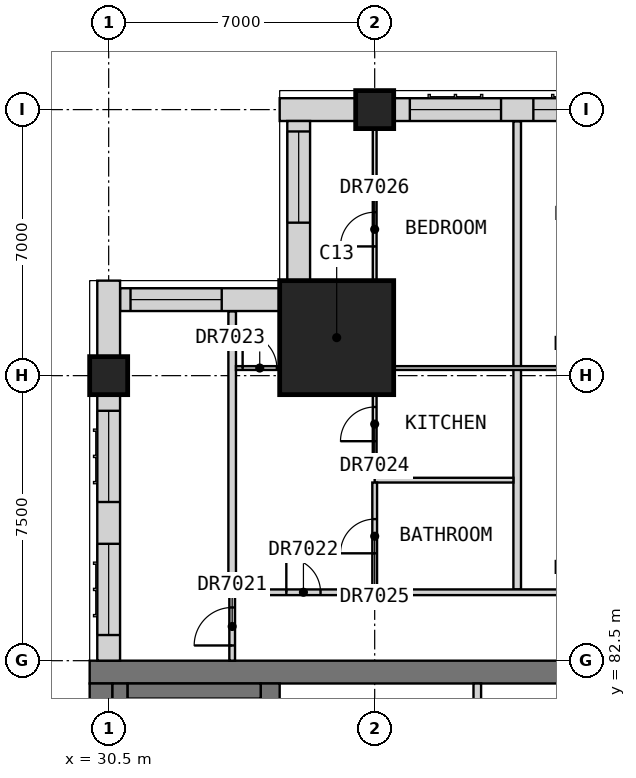
"""IFC4 building model, lengths in metres.
Left out: names, types, materials, properties, quantities, classifications, styles, units other than length and angle.
Written with IfcOpenShell. Run it as: python <this file> out.ifc"""

import sys

from ifc_helpers import new_model, si_unit, direction, frame, frame_2d, origin, origin_2d, place, context, subcontext, project, spatial, rectangle, extrude, element, fill, save


model = new_model("IFC4")
c1 = context("Model", 3, precision=1e-05, world=origin(), true_north=direction((0.0, 1.0)))
c2 = subcontext(c1, "Body", "Model", "MODEL_VIEW")
j1 = project(units=[si_unit("LENGTHUNIT", "METRE"), si_unit("PLANEANGLEUNIT", "RADIAN")], contexts=[c1])
p1 = place(None, origin())
s1 = spatial("IfcSite", under=j1, at=p1, CompositionType="ELEMENT")
p2 = place(p1, origin())
s2 = spatial("IfcBuilding", under=s1, at=p2, CompositionType="ELEMENT")
p3 = place(p2, frame((0.0, 0.0, 230.2)))
s3 = spatial("IfcBuildingStorey", under=s2, at=p3, CompositionType="ELEMENT", Elevation=230.2)
for number, where, z_axis, x_axis in (
    (1, (30.5, 90.0, 0.0), (0.0, 0.0, 1.0), (1.0, 0.0, 0.0)),
    (2, (37.5, 97.0, 0.0), (0.0, 0.0, 1.0), (1.0, 0.0, 0.0)),
):
    element("IfcColumn", number, at=place(p3, frame(where, z_axis=z_axis, x_axis=x_axis)), inside=s3, PredefinedType="COLUMN", context=c2, shape_type="SweptSolid", body=[
        extrude(rectangle(XDim=1.0, YDim=1.0, at=origin_2d()), origin(), (0.0, 0.0, 1.0), 3.5),
    ])
p4 = place(p3, frame((36.5, 91.0, 0.0), z_axis=(0.0, 0.0, 1.0), x_axis=(1.0, 0.0, 0.0)))
e3 = element("IfcColumn", 3, at=p4, inside=s3, PredefinedType="COLUMN", context=c2, shape_type="SweptSolid", body=[
    extrude(rectangle(XDim=3.0, YDim=3.0, at=origin_2d()), origin(), (0.0, 0.0, 1.0), 3.5),
])
p5 = place(p3, frame((30.0, 82.2, 0.0), z_axis=(0.0, 0.0, 1.0), x_axis=(1.0, 0.0, 0.0)))
e4 = element("IfcWall", 4, at=p5, inside=s3, PredefinedType="SHEAR", context=c2, shape_type="SweptSolid", body=[
    extrude(rectangle(XDim=30.0, YDim=0.6, at=frame_2d((15.0, 0.0))), origin(), (0.0, 0.0, 1.0), 3.5),
])
p6 = place(p3, frame((30.3, 60.6, 0.0), z_axis=(0.0, 0.0, 1.0), x_axis=(0.0, 1.0, 0.0)))
e5 = element("IfcWall", 5, at=p6, inside=s3, PredefinedType="SHEAR", context=c2, shape_type="SweptSolid", body=[
    extrude(rectangle(XDim=21.3, YDim=0.6, at=frame_2d((10.65, 0.0))), origin(), (0.0, 0.0, 1.0), 3.5),
])
p7 = place(p3, frame((34.75, 78.3, 0.0), z_axis=(0.0, 0.0, 1.0), x_axis=(0.0, 1.0, 0.0)))
e6 = element("IfcWall", 6, at=p7, inside=s3, PredefinedType="SHEAR", context=c2, shape_type="SweptSolid", body=[
    extrude(rectangle(XDim=3.6, YDim=0.5, at=frame_2d((1.8, 0.0))), origin(), (0.0, 0.0, 1.0), 3.5),
])
p8 = place(p3, frame((44.5, 97.0, 0.0), z_axis=(0.0, 0.0, 1.0), x_axis=(-1.0, 0.0, 0.0)))
e7 = element("IfcWall", 7, at=p8, inside=s3, PredefinedType="SOLIDWALL", context=c2, shape_type="SweptSolid", body=[
    extrude(rectangle(XDim=6.5, YDim=0.6, at=frame_2d((3.25, 0.0))), origin(), (0.0, 0.0, 1.0), 2.75),
])
p9 = place(p8, frame((3.675, 0.0, 0.8)))
e8 = element("IfcOpeningElement", 8, at=p9, cuts=e7, PredefinedType="OPENING", context=c2, shape_type="SweptSolid", body=[
    extrude(rectangle(XDim=2.4, YDim=1.8, at=frame_2d((1.2, 0.9))), frame((0.0, 0.31, 0.0), z_axis=(0.0, -1.0, 0.0), x_axis=(1.0, 0.0, 0.0)), (0.0, 0.0, 1.0), 0.62),
])
p10 = place(p8, frame((0.425, 0.0, 0.8)))
e9 = element("IfcOpeningElement", 9, at=p10, cuts=e7, PredefinedType="OPENING", context=c2, shape_type="SweptSolid", body=[
    extrude(rectangle(XDim=2.4, YDim=1.8, at=frame_2d((1.2, 0.9))), frame((0.0, 0.31, 0.0), z_axis=(0.0, -1.0, 0.0), x_axis=(1.0, 0.0, 0.0)), (0.0, 0.0, 1.0), 0.62),
])
p11 = place(p3, frame((37.0, 97.0, 0.0), z_axis=(0.0, 0.0, 1.0), x_axis=(-1.0, 0.0, 0.0)))
e10 = element("IfcWall", 10, at=p11, inside=s3, PredefinedType="SOLIDWALL", context=c2, shape_type="SweptSolid", body=[
    extrude(rectangle(XDim=2.0, YDim=0.6, at=frame_2d((1.0, 0.0))), origin(), (0.0, 0.0, 1.0), 3.25),
])
p12 = place(p3, frame((35.5, 96.7, 0.0), z_axis=(0.0, 0.0, 1.0), x_axis=(0.0, -1.0, 0.0)))
e11 = element("IfcWall", 11, at=p12, inside=s3, PredefinedType="SOLIDWALL", context=c2, shape_type="SweptSolid", body=[
    extrude(rectangle(XDim=4.2, YDim=0.6, at=frame_2d((2.1, 0.0))), origin(), (0.0, 0.0, 1.0), 3.25),
])
p13 = place(p12, frame((0.275, 0.0, 0.8)))
e12 = element("IfcOpeningElement", 12, at=p13, cuts=e11, PredefinedType="OPENING", context=c2, shape_type="SweptSolid", body=[
    extrude(rectangle(XDim=2.4, YDim=1.8, at=frame_2d((1.2, 0.9))), frame((0.0, 0.31, 0.0), z_axis=(0.0, -1.0, 0.0), x_axis=(1.0, 0.0, 0.0)), (0.0, 0.0, 1.0), 0.62),
])
p14 = place(p3, frame((35.0, 92.0, 0.0), z_axis=(0.0, 0.0, 1.0), x_axis=(-1.0, 0.0, 0.0)))
e13 = element("IfcWall", 13, at=p14, inside=s3, PredefinedType="SOLIDWALL", context=c2, shape_type="SweptSolid", body=[
    extrude(rectangle(XDim=4.2, YDim=0.6, at=frame_2d((2.1, 0.0))), origin(), (0.0, 0.0, 1.0), 3.25),
])
p15 = place(p14, frame((1.525, 0.0, 0.8)))
e14 = element("IfcOpeningElement", 14, at=p15, cuts=e13, PredefinedType="OPENING", context=c2, shape_type="SweptSolid", body=[
    extrude(rectangle(XDim=2.4, YDim=1.8, at=frame_2d((1.2, 0.9))), frame((0.0, 0.31, 0.0), z_axis=(0.0, -1.0, 0.0), x_axis=(1.0, 0.0, 0.0)), (0.0, 0.0, 1.0), 0.62),
])
p16 = place(p3, frame((30.5, 92.5, 0.0), z_axis=(0.0, 0.0, 1.0), x_axis=(0.0, -1.0, 0.0)))
e15 = element("IfcWall", 15, at=p16, inside=s3, PredefinedType="SOLIDWALL", context=c2, shape_type="SweptSolid", body=[
    extrude(rectangle(XDim=2.0, YDim=0.6, at=frame_2d((1.0, 0.0))), origin(), (0.0, 0.0, 1.0), 3.25),
])
p17 = place(p3, frame((30.5, 89.5, 0.0), z_axis=(0.0, 0.0, 1.0), x_axis=(0.0, -1.0, 0.0)))
e16 = element("IfcWall", 16, at=p17, inside=s3, PredefinedType="SOLIDWALL", context=c2, shape_type="SweptSolid", body=[
    extrude(rectangle(XDim=7.0, YDim=0.6, at=frame_2d((3.5, 0.0))), origin(), (0.0, 0.0, 1.0), 3.25),
])
p18 = place(p17, frame((3.925, 0.0, 0.8)))
e17 = element("IfcOpeningElement", 17, at=p18, cuts=e16, PredefinedType="OPENING", context=c2, shape_type="SweptSolid", body=[
    extrude(rectangle(XDim=2.4, YDim=1.8, at=frame_2d((1.2, 0.9))), frame((0.0, 0.31, 0.0), z_axis=(0.0, -1.0, 0.0), x_axis=(1.0, 0.0, 0.0)), (0.0, 0.0, 1.0), 0.62),
])
p19 = place(p17, frame((0.425, 0.0, 0.8)))
e18 = element("IfcOpeningElement", 18, at=p19, cuts=e16, PredefinedType="OPENING", context=c2, shape_type="SweptSolid", body=[
    extrude(rectangle(XDim=2.4, YDim=1.8, at=frame_2d((1.2, 0.9))), frame((0.0, 0.31, 0.0), z_axis=(0.0, -1.0, 0.0), x_axis=(1.0, 0.0, 0.0)), (0.0, 0.0, 1.0), 0.62),
])
p20 = place(p3, frame((40.2, 78.5, 0.0), z_axis=(0.0, 0.0, 1.0), x_axis=(0.0, 1.0, 0.0)))
e19 = element("IfcWall", 19, at=p20, inside=s3, PredefinedType="SOLIDWALL", context=c2, shape_type="SweptSolid", body=[
    extrude(rectangle(XDim=3.4, YDim=0.2, at=frame_2d((1.7, 0.0))), origin(), (0.0, 0.0, 1.0), 3.5),
])
p21 = place(p3, frame((30.8, 60.6, 0.0), z_axis=(0.0, 0.0, 1.0), x_axis=(0.0, 1.0, 0.0)))
e20 = element("IfcWall", 20, at=p21, inside=s3, PredefinedType="SOLIDWALL", context=c2, shape_type="SweptSolid", body=[
    extrude(rectangle(XDim=21.3, YDim=0.4, at=frame_2d((10.65, 0.0))), origin(), (0.0, 0.0, 1.0), 3.25),
])
p22 = place(p3, frame((31.0, 81.7, 0.0), z_axis=(0.0, 0.0, 1.0), x_axis=(1.0, 0.0, 0.0)))
e21 = element("IfcWall", 21, at=p22, inside=s3, PredefinedType="SOLIDWALL", context=c2, shape_type="SweptSolid", body=[
    extrude(rectangle(XDim=3.5, YDim=0.4, at=frame_2d((1.75, 0.0))), origin(), (0.0, 0.0, 1.0), 3.25),
])
p23 = place(p3, frame((33.75, 84.3, 0.0), z_axis=(0.0, 0.0, 1.0), x_axis=(0.0, 1.0, 0.0)))
e22 = element("IfcWall", 22, at=p23, inside=s3, PredefinedType="PARTITIONING", context=c2, shape_type="SweptSolid", body=[
    extrude(rectangle(XDim=7.39, YDim=0.2, at=frame_2d((3.695, 0.0))), origin(), (0.0, 0.0, 1.0), 3.25),
])
p24 = place(p3, frame((41.25, 84.375, 0.0), z_axis=(0.0, 0.0, 1.0), x_axis=(0.0, 1.0, 0.0)))
e23 = element("IfcWall", 23, at=p24, inside=s3, PredefinedType="PARTITIONING", context=c2, shape_type="SweptSolid", body=[
    extrude(rectangle(XDim=12.315, YDim=0.2, at=frame_2d((6.157, 0.0))), origin(), (0.0, 0.0, 1.0), 3.25),
])
p25 = place(p3, frame((33.85, 84.3, 0.0), z_axis=(0.0, 0.0, 1.0), x_axis=(1.0, 0.0, 0.0)))
e24 = element("IfcWall", 24, at=p25, inside=s3, PredefinedType="PARTITIONING", context=c2, shape_type="SweptSolid", body=[
    extrude(rectangle(XDim=27.95, YDim=0.15, at=frame_2d((13.975, 0.0))), origin(), (0.0, 0.0, 1.0), 3.25),
])
p26 = place(p25, frame((1.325, 0.0, 0.0)))
e25 = element("IfcOpeningElement", 25, at=p26, cuts=e24, PredefinedType="OPENING", context=c2, shape_type="SweptSolid", body=[
    extrude(rectangle(XDim=0.9, YDim=2.1, at=frame_2d((0.45, 1.05))), frame((0.0, 0.085, 0.0), z_axis=(0.0, -1.0, 0.0), x_axis=(1.0, 0.0, 0.0)), (0.0, 0.0, 1.0), 0.17),
])
p27 = place(p25, frame((8.825, 0.0, 0.0)))
e26 = element("IfcOpeningElement", 26, at=p27, cuts=e24, PredefinedType="OPENING", context=c2, shape_type="SweptSolid", body=[
    extrude(rectangle(XDim=0.9, YDim=2.1, at=frame_2d((0.45, 1.05))), frame((0.0, 0.085, 0.0), z_axis=(0.0, -1.0, 0.0), x_axis=(1.0, 0.0, 0.0)), (0.0, 0.0, 1.0), 0.17),
])
p28 = place(p25, frame((20.075, 0.0, 0.0)))
e27 = element("IfcOpeningElement", 27, at=p28, cuts=e24, PredefinedType="OPENING", context=c2, shape_type="SweptSolid", body=[
    extrude(rectangle(XDim=0.9, YDim=2.1, at=frame_2d((0.45, 1.05))), frame((0.0, 0.085, 0.0), z_axis=(0.0, -1.0, 0.0), x_axis=(1.0, 0.0, 0.0)), (0.0, 0.0, 1.0), 0.17),
])
p29 = place(p25, frame((26.55, 0.0, 0.0)))
e28 = element("IfcOpeningElement", 28, at=p29, cuts=e24, PredefinedType="OPENING", context=c2, shape_type="SweptSolid", body=[
    extrude(rectangle(XDim=1.0, YDim=2.1, at=frame_2d((0.5, 1.05))), frame((0.0, 0.085, 0.0), z_axis=(0.0, -1.0, 0.0), x_axis=(1.0, 0.0, 0.0)), (0.0, 0.0, 1.0), 0.17),
])
p30 = place(p3, frame((33.75, 82.5, 0.0), z_axis=(0.0, 0.0, 1.0), x_axis=(0.0, 1.0, 0.0)))
e29 = element("IfcWall", 29, at=p30, inside=s3, PredefinedType="PARTITIONING", context=c2, shape_type="SweptSolid", body=[
    extrude(rectangle(XDim=1.725, YDim=0.15, at=frame_2d((0.863, 0.0))), origin(), (0.0, 0.0, 1.0), 3.25),
])
p31 = place(p30, frame((0.4, 0.0, 0.0)))
e30 = element("IfcOpeningElement", 30, at=p31, cuts=e29, PredefinedType="OPENING", context=c2, shape_type="SweptSolid", body=[
    extrude(rectangle(XDim=1.0, YDim=2.1, at=frame_2d((0.5, 1.05))), frame((0.0, 0.085, 0.0), z_axis=(0.0, -1.0, 0.0), x_axis=(1.0, 0.0, 0.0)), (0.0, 0.0, 1.0), 0.17),
])
p32 = place(p3, frame((33.85, 90.2, 0.0), z_axis=(0.0, 0.0, 1.0), x_axis=(1.0, 0.0, 0.0)))
e31 = element("IfcWall", 31, at=p32, inside=s3, PredefinedType="PARTITIONING", context=c2, shape_type="SweptSolid", body=[
    extrude(rectangle(XDim=26.05, YDim=0.1, at=frame_2d((13.025, 0.0))), origin(), (0.0, 0.0, 1.0), 3.25),
])
p33 = place(p32, frame((0.175, 0.0, 0.0)))
e32 = element("IfcOpeningElement", 32, at=p33, cuts=e31, PredefinedType="OPENING", context=c2, shape_type="SweptSolid", body=[
    extrude(rectangle(XDim=0.9, YDim=2.1, at=frame_2d((0.45, 1.05))), frame((0.0, 0.06, 0.0), z_axis=(0.0, -1.0, 0.0), x_axis=(1.0, 0.0, 0.0)), (0.0, 0.0, 1.0), 0.12),
])
p34 = place(p32, frame((8.825, 0.0, 0.0)))
e33 = element("IfcOpeningElement", 33, at=p34, cuts=e31, PredefinedType="OPENING", context=c2, shape_type="SweptSolid", body=[
    extrude(rectangle(XDim=0.9, YDim=2.1, at=frame_2d((0.45, 1.05))), frame((0.0, 0.06, 0.0), z_axis=(0.0, -1.0, 0.0), x_axis=(1.0, 0.0, 0.0)), (0.0, 0.0, 1.0), 0.12),
])
p35 = place(p32, frame((16.325, 0.0, 0.0)))
e34 = element("IfcOpeningElement", 34, at=p35, cuts=e31, PredefinedType="OPENING", context=c2, shape_type="SweptSolid", body=[
    extrude(rectangle(XDim=0.9, YDim=2.1, at=frame_2d((0.45, 1.05))), frame((0.0, 0.06, 0.0), z_axis=(0.0, -1.0, 0.0), x_axis=(1.0, 0.0, 0.0)), (0.0, 0.0, 1.0), 0.12),
])
p36 = place(p32, frame((20.075, 0.0, 0.0)))
e35 = element("IfcOpeningElement", 35, at=p36, cuts=e31, PredefinedType="OPENING", context=c2, shape_type="SweptSolid", body=[
    extrude(rectangle(XDim=0.9, YDim=2.1, at=frame_2d((0.45, 1.05))), frame((0.0, 0.06, 0.0), z_axis=(0.0, -1.0, 0.0), x_axis=(1.0, 0.0, 0.0)), (0.0, 0.0, 1.0), 0.12),
])
p37 = place(p3, frame((37.5, 87.312, 0.0), z_axis=(0.0, 0.0, 1.0), x_axis=(0.0, 1.0, 0.0)))
e36 = element("IfcWall", 36, at=p37, inside=s3, PredefinedType="PARTITIONING", context=c2, shape_type="SweptSolid", body=[
    extrude(rectangle(XDim=10.188, YDim=0.1, at=frame_2d((5.094, 0.0))), origin(), (0.0, 0.0, 1.0), 2.75),
])
p38 = place(p37, frame((0.962, 0.0, 0.0)))
e37 = element("IfcOpeningElement", 37, at=p38, cuts=e36, PredefinedType="OPENING", context=c2, shape_type="SweptSolid", body=[
    extrude(rectangle(XDim=0.9, YDim=2.1, at=frame_2d((0.45, 1.05))), frame((0.0, 0.06, 0.0), z_axis=(0.0, -1.0, 0.0), x_axis=(1.0, 0.0, 0.0)), (0.0, 0.0, 1.0), 0.12),
])
p39 = place(p37, frame((6.087, 0.0, 0.0)))
e38 = element("IfcOpeningElement", 38, at=p39, cuts=e36, PredefinedType="OPENING", context=c2, shape_type="SweptSolid", body=[
    extrude(rectangle(XDim=0.9, YDim=2.1, at=frame_2d((0.45, 1.05))), frame((0.0, 0.06, 0.0), z_axis=(0.0, -1.0, 0.0), x_axis=(1.0, 0.0, 0.0)), (0.0, 0.0, 1.0), 0.12),
])
p40 = place(p3, frame((37.5, 87.25, 0.0), z_axis=(0.0, 0.0, 1.0), x_axis=(1.0, 0.0, 0.0)))
e39 = element("IfcWall", 39, at=p40, inside=s3, PredefinedType="PARTITIONING", context=c2, shape_type="SweptSolid", body=[
    extrude(rectangle(XDim=3.65, YDim=0.125, at=frame_2d((1.825, 0.0))), origin(), (0.0, 0.0, 1.0), 3.25),
])
p41 = place(p3, frame((37.5, 84.375, 0.0), z_axis=(0.0, 0.0, 1.0), x_axis=(0.0, 1.0, 0.0)))
e40 = element("IfcWall", 40, at=p41, inside=s3, PredefinedType="PARTITIONING", context=c2, shape_type="SweptSolid", body=[
    extrude(rectangle(XDim=2.812, YDim=0.125, at=frame_2d((1.406, 0.0))), origin(), (0.0, 0.0, 1.0), 3.25),
])
p42 = place(p41, frame((0.95, 0.0, 0.0)))
e41 = element("IfcOpeningElement", 41, at=p42, cuts=e40, PredefinedType="OPENING", context=c2, shape_type="SweptSolid", body=[
    extrude(rectangle(XDim=0.9, YDim=2.1, at=frame_2d((0.45, 1.05))), frame((0.0, 0.073, 0.0), z_axis=(0.0, -1.0, 0.0), x_axis=(1.0, 0.0, 0.0)), (0.0, 0.0, 1.0), 0.145),
])
p43 = place(p9, origin())
e42 = element("IfcWindow", 42, at=p43, inside=s3, PartitioningType="SINGLE_PANEL", PredefinedType="WINDOW", context=c2, shape_type="SweptSolid", body=[
    extrude(rectangle(XDim=2.4, YDim=1.8, at=frame_2d((1.2, 0.9))), frame((0.0, -0.07, 0.0), z_axis=(0.0, -1.0, 0.0), x_axis=(1.0, 0.0, 0.0)), (0.0, 0.0, 1.0), 0.06),
])
fill(e8, e42)
p44 = place(p10, origin())
e43 = element("IfcWindow", 43, at=p44, inside=s3, PartitioningType="SINGLE_PANEL", PredefinedType="WINDOW", context=c2, shape_type="SweptSolid", body=[
    extrude(rectangle(XDim=2.4, YDim=1.8, at=frame_2d((1.2, 0.9))), frame((0.0, -0.07, 0.0), z_axis=(0.0, -1.0, 0.0), x_axis=(1.0, 0.0, 0.0)), (0.0, 0.0, 1.0), 0.06),
])
fill(e9, e43)
p45 = place(p13, origin())
e44 = element("IfcWindow", 44, at=p45, inside=s3, PartitioningType="SINGLE_PANEL", PredefinedType="WINDOW", context=c2, shape_type="SweptSolid", body=[
    extrude(rectangle(XDim=2.4, YDim=1.8, at=frame_2d((1.2, 0.9))), frame((0.0, -0.07, 0.0), z_axis=(0.0, -1.0, 0.0), x_axis=(1.0, 0.0, 0.0)), (0.0, 0.0, 1.0), 0.06),
])
fill(e12, e44)
p46 = place(p15, origin())
e45 = element("IfcWindow", 45, at=p46, inside=s3, PartitioningType="SINGLE_PANEL", PredefinedType="WINDOW", context=c2, shape_type="SweptSolid", body=[
    extrude(rectangle(XDim=2.4, YDim=1.8, at=frame_2d((1.2, 0.9))), frame((0.0, -0.07, 0.0), z_axis=(0.0, -1.0, 0.0), x_axis=(1.0, 0.0, 0.0)), (0.0, 0.0, 1.0), 0.06),
])
fill(e14, e45)
p47 = place(p18, origin())
e46 = element("IfcWindow", 46, at=p47, inside=s3, PartitioningType="SINGLE_PANEL", PredefinedType="WINDOW", context=c2, shape_type="SweptSolid", body=[
    extrude(rectangle(XDim=2.4, YDim=1.8, at=frame_2d((1.2, 0.9))), frame((0.0, -0.07, 0.0), z_axis=(0.0, -1.0, 0.0), x_axis=(1.0, 0.0, 0.0)), (0.0, 0.0, 1.0), 0.06),
])
fill(e17, e46)
p48 = place(p19, origin())
e47 = element("IfcWindow", 47, at=p48, inside=s3, PartitioningType="SINGLE_PANEL", PredefinedType="WINDOW", context=c2, shape_type="SweptSolid", body=[
    extrude(rectangle(XDim=2.4, YDim=1.8, at=frame_2d((1.2, 0.9))), frame((0.0, -0.07, 0.0), z_axis=(0.0, -1.0, 0.0), x_axis=(1.0, 0.0, 0.0)), (0.0, 0.0, 1.0), 0.06),
])
fill(e18, e47)
p49 = place(p31, origin())
e48 = element("IfcDoor", 48, at=p49, inside=s3, OperationType="SINGLE_SWING_LEFT", PredefinedType="DOOR", context=c2, shape_type="SweptSolid", body=[
    extrude(rectangle(XDim=1.0, YDim=2.1, at=frame_2d((0.5, 1.05))), frame((0.0, 0.025, 0.0), z_axis=(0.0, -1.0, 0.0), x_axis=(1.0, 0.0, 0.0)), (0.0, 0.0, 1.0), 0.05),
])
fill(e30, e48)
p50 = place(p26, origin())
e49 = element("IfcDoor", 49, at=p50, inside=s3, OperationType="SINGLE_SWING_LEFT", PredefinedType="DOOR", context=c2, shape_type="SweptSolid", body=[
    extrude(rectangle(XDim=0.9, YDim=2.1, at=frame_2d((0.45, 1.05))), frame((0.0, 0.025, 0.0), z_axis=(0.0, -1.0, 0.0), x_axis=(1.0, 0.0, 0.0)), (0.0, 0.0, 1.0), 0.05),
])
fill(e25, e49)
p51 = place(p33, origin())
e50 = element("IfcDoor", 50, at=p51, inside=s3, OperationType="SINGLE_SWING_RIGHT", PredefinedType="DOOR", context=c2, shape_type="SweptSolid", body=[
    extrude(rectangle(XDim=0.9, YDim=2.1, at=frame_2d((0.45, 1.05))), frame((0.0, 0.025, 0.0), z_axis=(0.0, -1.0, 0.0), x_axis=(1.0, 0.0, 0.0)), (0.0, 0.0, 1.0), 0.05),
])
fill(e32, e50)
p52 = place(p38, origin())
e51 = element("IfcDoor", 51, at=p52, inside=s3, OperationType="SINGLE_SWING_RIGHT", PredefinedType="DOOR", context=c2, shape_type="SweptSolid", body=[
    extrude(rectangle(XDim=0.9, YDim=2.1, at=frame_2d((0.45, 1.05))), frame((0.0, 0.025, 0.0), z_axis=(0.0, -1.0, 0.0), x_axis=(1.0, 0.0, 0.0)), (0.0, 0.0, 1.0), 0.05),
])
fill(e37, e51)
p53 = place(p42, origin())
e52 = element("IfcDoor", 52, at=p53, inside=s3, OperationType="SINGLE_SWING_RIGHT", PredefinedType="DOOR", context=c2, shape_type="SweptSolid", body=[
    extrude(rectangle(XDim=0.9, YDim=2.1, at=frame_2d((0.45, 1.05))), frame((0.0, 0.025, 0.0), z_axis=(0.0, -1.0, 0.0), x_axis=(1.0, 0.0, 0.0)), (0.0, 0.0, 1.0), 0.05),
])
fill(e41, e52)
p54 = place(p39, origin())
e53 = element("IfcDoor", 53, at=p54, inside=s3, OperationType="SINGLE_SWING_LEFT", PredefinedType="DOOR", context=c2, shape_type="SweptSolid", body=[
    extrude(rectangle(XDim=0.9, YDim=2.1, at=frame_2d((0.45, 1.05))), frame((0.0, 0.025, 0.0), z_axis=(0.0, -1.0, 0.0), x_axis=(1.0, 0.0, 0.0)), (0.0, 0.0, 1.0), 0.05),
])
fill(e38, e53)
save(model, sys.argv[1])
